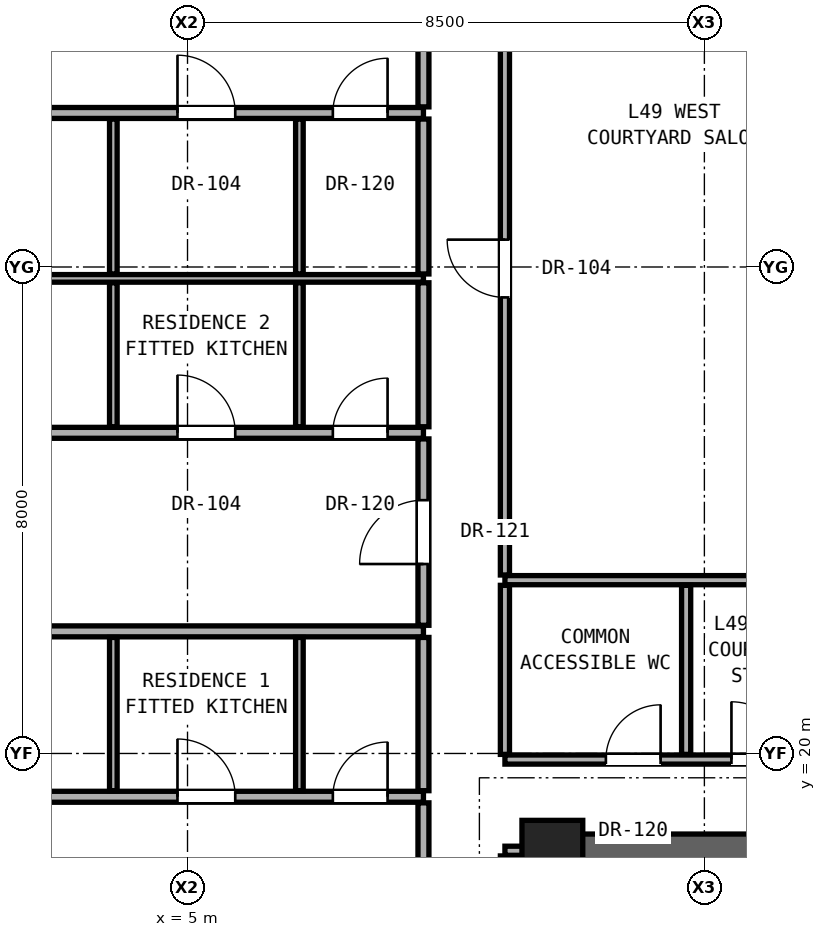
"""IFC4 building model, lengths in metres.
Left out: names, types, materials, properties, quantities, classifications, styles, units other than length and angle.
Written with IfcOpenShell. Run it as: python <this file> out.ifc"""

import sys

from ifc_helpers import new_model, si_unit, direction, frame, frame_2d, origin, origin_2d, place, context, subcontext, project, spatial, rectangle, extrude, element, fill, save


model = new_model("IFC4")
c1 = context("Model", 3, precision=1e-05, world=origin(), true_north=direction((0.0, 1.0)))
c2 = subcontext(c1, "Body", "Model", "MODEL_VIEW")
j1 = project(units=[si_unit("LENGTHUNIT", "METRE"), si_unit("PLANEANGLEUNIT", "RADIAN")], contexts=[c1])
p1 = place(None, origin())
s1 = spatial("IfcSite", under=j1, at=p1, CompositionType="ELEMENT")
p2 = place(p1, origin())
s2 = spatial("IfcBuilding", under=s1, at=p2, CompositionType="ELEMENT")
p3 = place(p2, frame((0.0, 0.0, 173.9)))
s3 = spatial("IfcBuildingStorey", under=s2, at=p3, CompositionType="ELEMENT", Elevation=173.9)
p4 = place(p3, frame((11.0, 18.4, 0.0), z_axis=(0.0, 0.0, 1.0), x_axis=(1.0, 0.0, 0.0)))
e1 = element("IfcColumn", 1, at=p4, inside=s3, PredefinedType="COLUMN", context=c2, shape_type="SweptSolid", body=[
    extrude(rectangle(XDim=1.0, YDim=1.0, at=origin_2d()), origin(), (0.0, 0.0, 1.0), 3.25),
])
p5 = place(p3, frame((11.0, 12.4, 0.0), z_axis=(0.0, 0.0, 1.0), x_axis=(0.0, 1.0, 0.0)))
e2 = element("IfcWall", 2, at=p5, inside=s3, PredefinedType="SHEAR", context=c2, shape_type="SweptSolid", body=[
    extrude(rectangle(XDim=6.0, YDim=0.55, at=frame_2d((3.0, 0.0))), origin(), (0.0, 0.0, 1.0), 3.05),
])
p6 = place(p3, frame((11.0, 18.4, 0.0), z_axis=(0.0, 0.0, 1.0), x_axis=(1.0, 0.0, 0.0)))
e3 = element("IfcWall", 3, at=p6, inside=s3, PredefinedType="SHEAR", context=c2, shape_type="SweptSolid", body=[
    extrude(rectangle(XDim=19.0, YDim=0.55, at=frame_2d((9.5, 0.0))), origin(), (0.0, 0.0, 1.0), 3.05),
])
p7 = place(p6, frame((4.175, 0.0, 0.0)))
e4 = element("IfcOpeningElement", 4, at=p7, cuts=e3, PredefinedType="OPENING", context=c2, shape_type="SweptSolid", body=[
    extrude(rectangle(XDim=1.2, YDim=2.25, at=frame_2d((0.6, 1.125))), frame((0.0, 0.285, 0.0), z_axis=(0.0, -1.0, 0.0), x_axis=(1.0, 0.0, 0.0)), (0.0, 0.0, 1.0), 0.57),
])
p8 = place(p6, frame((11.075, 0.0, 0.0)))
e5 = element("IfcOpeningElement", 5, at=p8, cuts=e3, PredefinedType="OPENING", context=c2, shape_type="SweptSolid", body=[
    extrude(rectangle(XDim=0.95, YDim=2.15, at=frame_2d((0.475, 1.075))), frame((0.0, 0.285, 0.0), z_axis=(0.0, -1.0, 0.0), x_axis=(1.0, 0.0, 0.0)), (0.0, 0.0, 1.0), 0.57),
])
p9 = place(p6, frame((14.3, 0.0, 0.0)))
e6 = element("IfcOpeningElement", 6, at=p9, cuts=e3, PredefinedType="OPENING", context=c2, shape_type="SweptSolid", body=[
    extrude(rectangle(XDim=1.3, YDim=2.3, at=frame_2d((0.65, 1.15))), frame((0.0, 0.285, 0.0), z_axis=(0.0, -1.0, 0.0), x_axis=(1.0, 0.0, 0.0)), (0.0, 0.0, 1.0), 0.57),
])
p10 = place(p6, frame((16.6, 0.0, 0.0)))
e7 = element("IfcOpeningElement", 7, at=p10, cuts=e3, PredefinedType="OPENING", context=c2, shape_type="SweptSolid", body=[
    extrude(rectangle(XDim=1.3, YDim=2.3, at=frame_2d((0.65, 1.15))), frame((0.0, 0.285, 0.0), z_axis=(0.0, -1.0, 0.0), x_axis=(1.0, 0.0, 0.0)), (0.0, 0.0, 1.0), 0.57),
])
p11 = place(p3, frame((10.22, 18.4, 0.0), z_axis=(0.0, 0.0, 1.0), x_axis=(1.0, 0.0, 0.0)))
e8 = element("IfcWall", 8, at=p11, inside=s3, PredefinedType="PARTITIONING", context=c2, shape_type="SweptSolid", body=[
    extrude(rectangle(XDim=0.51, YDim=0.15, at=frame_2d((0.255, 0.0))), origin(), (0.0, 0.0, 1.0), 2.442),
])
p12 = place(p3, frame((-0.81, 19.288, 0.0), z_axis=(0.0, 0.0, 1.0), x_axis=(1.0, 0.0, 0.0)))
e9 = element("IfcWall", 9, at=p12, inside=s3, PredefinedType="PARTITIONING", context=c2, shape_type="SweptSolid", body=[
    extrude(rectangle(XDim=9.69, YDim=0.18, at=frame_2d((4.845, 0.0))), origin(), (0.0, 0.0, 1.0), 2.269),
])
p13 = place(p12, frame((1.24, 0.0, 0.0)))
e10 = element("IfcOpeningElement", 10, at=p13, cuts=e9, PredefinedType="OPENING", context=c2, shape_type="SweptSolid", body=[
    extrude(rectangle(XDim=0.95, YDim=2.15, at=frame_2d((0.475, 1.075))), frame((0.0, 0.1, 0.0), z_axis=(0.0, -1.0, 0.0), x_axis=(1.0, 0.0, 0.0)), (0.0, 0.0, 1.0), 0.2),
])
p14 = place(p12, frame((5.645, 0.0, 0.0)))
e11 = element("IfcOpeningElement", 11, at=p14, cuts=e9, PredefinedType="OPENING", context=c2, shape_type="SweptSolid", body=[
    extrude(rectangle(XDim=0.95, YDim=2.15, at=frame_2d((0.475, 1.075))), frame((0.0, 0.1, 0.0), z_axis=(0.0, -1.0, 0.0), x_axis=(1.0, 0.0, 0.0)), (0.0, 0.0, 1.0), 0.2),
])
p15 = place(p12, frame((8.2, 0.0, 0.0)))
e12 = element("IfcOpeningElement", 12, at=p15, cuts=e9, PredefinedType="OPENING", context=c2, shape_type="SweptSolid", body=[
    extrude(rectangle(XDim=0.9, YDim=2.1, at=frame_2d((0.45, 1.05))), frame((0.0, 0.1, 0.0), z_axis=(0.0, -1.0, 0.0), x_axis=(1.0, 0.0, 0.0)), (0.0, 0.0, 1.0), 0.2),
])
p16 = place(p3, frame((10.22, 19.9, 0.0), z_axis=(0.0, 0.0, 1.0), x_axis=(1.0, 0.0, 0.0)))
e13 = element("IfcWall", 13, at=p16, inside=s3, PredefinedType="PARTITIONING", context=c2, shape_type="SweptSolid", body=[
    extrude(rectangle(XDim=20.56, YDim=0.15, at=frame_2d((10.28, 0.0))), origin(), (0.0, 0.0, 1.0), 2.186),
])
p17 = place(p16, frame((1.66, 0.0, 0.0)))
e14 = element("IfcOpeningElement", 14, at=p17, cuts=e13, PredefinedType="OPENING", context=c2, shape_type="SweptSolid", body=[
    extrude(rectangle(XDim=0.9, YDim=2.1, at=frame_2d((0.45, 1.05))), frame((0.0, 0.085, 0.0), z_axis=(0.0, -1.0, 0.0), x_axis=(1.0, 0.0, 0.0)), (0.0, 0.0, 1.0), 0.17),
])
p18 = place(p16, frame((3.725, 0.0, 0.0)))
e15 = element("IfcOpeningElement", 15, at=p18, cuts=e13, PredefinedType="OPENING", context=c2, shape_type="SweptSolid", body=[
    extrude(rectangle(XDim=0.95, YDim=2.15, at=frame_2d((0.475, 1.075))), frame((0.0, 0.085, 0.0), z_axis=(0.0, -1.0, 0.0), x_axis=(1.0, 0.0, 0.0)), (0.0, 0.0, 1.0), 0.17),
])
p19 = place(p16, frame((9.234, 0.0, 0.0)))
e16 = element("IfcOpeningElement", 16, at=p19, cuts=e13, PredefinedType="OPENING", context=c2, shape_type="SweptSolid", body=[
    extrude(rectangle(XDim=0.85, YDim=2.01, at=frame_2d((0.425, 1.005))), frame((0.0, 0.085, 0.0), z_axis=(0.0, -1.0, 0.0), x_axis=(1.0, 0.0, 0.0)), (0.0, 0.0, 1.0), 0.17),
])
p20 = place(p16, frame((16.784, 0.0, 0.0)))
e17 = element("IfcOpeningElement", 17, at=p20, cuts=e13, PredefinedType="OPENING", context=c2, shape_type="SweptSolid", body=[
    extrude(rectangle(XDim=0.85, YDim=2.01, at=frame_2d((0.425, 1.005))), frame((0.0, 0.085, 0.0), z_axis=(0.0, -1.0, 0.0), x_axis=(1.0, 0.0, 0.0)), (0.0, 0.0, 1.0), 0.17),
])
p21 = place(p3, frame((-0.81, 22.008, 0.0), z_axis=(0.0, 0.0, 1.0), x_axis=(1.0, 0.0, 0.0)))
e18 = element("IfcWall", 18, at=p21, inside=s3, PredefinedType="PARTITIONING", context=c2, shape_type="SweptSolid", body=[
    extrude(rectangle(XDim=9.69, YDim=0.18, at=frame_2d((4.845, 0.0))), origin(), (0.0, 0.0, 1.0), 2.269),
])
p22 = place(p3, frame((10.22, 22.85, 0.0), z_axis=(0.0, 0.0, 1.0), x_axis=(1.0, 0.0, 0.0)))
e19 = element("IfcWall", 19, at=p22, inside=s3, PredefinedType="PARTITIONING", context=c2, shape_type="SweptSolid", body=[
    extrude(rectangle(XDim=5.42, YDim=0.15, at=frame_2d((2.71, 0.0))), origin(), (0.0, 0.0, 1.0), 2.186),
])
p23 = place(p3, frame((-0.81, 25.273, 0.0), z_axis=(0.0, 0.0, 1.0), x_axis=(1.0, 0.0, 0.0)))
e20 = element("IfcWall", 20, at=p23, inside=s3, PredefinedType="PARTITIONING", context=c2, shape_type="SweptSolid", body=[
    extrude(rectangle(XDim=9.69, YDim=0.18, at=frame_2d((4.845, 0.0))), origin(), (0.0, 0.0, 1.0), 2.269),
])
p24 = place(p23, frame((1.24, 0.0, 0.0)))
e21 = element("IfcOpeningElement", 21, at=p24, cuts=e20, PredefinedType="OPENING", context=c2, shape_type="SweptSolid", body=[
    extrude(rectangle(XDim=0.95, YDim=2.15, at=frame_2d((0.475, 1.075))), frame((0.0, 0.1, 0.0), z_axis=(0.0, -1.0, 0.0), x_axis=(1.0, 0.0, 0.0)), (0.0, 0.0, 1.0), 0.2),
])
p25 = place(p23, frame((5.645, 0.0, 0.0)))
e22 = element("IfcOpeningElement", 22, at=p25, cuts=e20, PredefinedType="OPENING", context=c2, shape_type="SweptSolid", body=[
    extrude(rectangle(XDim=0.95, YDim=2.15, at=frame_2d((0.475, 1.075))), frame((0.0, 0.1, 0.0), z_axis=(0.0, -1.0, 0.0), x_axis=(1.0, 0.0, 0.0)), (0.0, 0.0, 1.0), 0.2),
])
p26 = place(p23, frame((8.2, 0.0, 0.0)))
e23 = element("IfcOpeningElement", 23, at=p26, cuts=e20, PredefinedType="OPENING", context=c2, shape_type="SweptSolid", body=[
    extrude(rectangle(XDim=0.9, YDim=2.1, at=frame_2d((0.45, 1.05))), frame((0.0, 0.1, 0.0), z_axis=(0.0, -1.0, 0.0), x_axis=(1.0, 0.0, 0.0)), (0.0, 0.0, 1.0), 0.2),
])
p27 = place(p3, frame((-0.81, 27.813, 0.0), z_axis=(0.0, 0.0, 1.0), x_axis=(1.0, 0.0, 0.0)))
e24 = element("IfcWall", 24, at=p27, inside=s3, PredefinedType="PARTITIONING", context=c2, shape_type="SweptSolid", body=[
    extrude(rectangle(XDim=9.69, YDim=0.125, at=frame_2d((4.845, 0.0))), origin(), (0.0, 0.0, 1.0), 2.269),
])
p28 = place(p3, frame((-0.81, 30.533, 0.0), z_axis=(0.0, 0.0, 1.0), x_axis=(1.0, 0.0, 0.0)))
e25 = element("IfcWall", 25, at=p28, inside=s3, PredefinedType="PARTITIONING", context=c2, shape_type="SweptSolid", body=[
    extrude(rectangle(XDim=9.69, YDim=0.18, at=frame_2d((4.845, 0.0))), origin(), (0.0, 0.0, 1.0), 2.269),
])
p29 = place(p28, frame((1.24, 0.0, 0.0)))
e26 = element("IfcOpeningElement", 26, at=p29, cuts=e25, PredefinedType="OPENING", context=c2, shape_type="SweptSolid", body=[
    extrude(rectangle(XDim=0.95, YDim=2.15, at=frame_2d((0.475, 1.075))), frame((0.0, 0.1, 0.0), z_axis=(0.0, -1.0, 0.0), x_axis=(1.0, 0.0, 0.0)), (0.0, 0.0, 1.0), 0.2),
])
p30 = place(p28, frame((5.645, 0.0, 0.0)))
e27 = element("IfcOpeningElement", 27, at=p30, cuts=e25, PredefinedType="OPENING", context=c2, shape_type="SweptSolid", body=[
    extrude(rectangle(XDim=0.95, YDim=2.15, at=frame_2d((0.475, 1.075))), frame((0.0, 0.1, 0.0), z_axis=(0.0, -1.0, 0.0), x_axis=(1.0, 0.0, 0.0)), (0.0, 0.0, 1.0), 0.2),
])
p31 = place(p28, frame((8.2, 0.0, 0.0)))
e28 = element("IfcOpeningElement", 28, at=p31, cuts=e25, PredefinedType="OPENING", context=c2, shape_type="SweptSolid", body=[
    extrude(rectangle(XDim=0.9, YDim=2.1, at=frame_2d((0.45, 1.05))), frame((0.0, 0.1, 0.0), z_axis=(0.0, -1.0, 0.0), x_axis=(1.0, 0.0, 0.0)), (0.0, 0.0, 1.0), 0.2),
])
p32 = place(p3, frame((3.78, 19.388, 0.0), z_axis=(0.0, 0.0, 1.0), x_axis=(0.0, 1.0, 0.0)))
e29 = element("IfcWall", 29, at=p32, inside=s3, PredefinedType="PARTITIONING", context=c2, shape_type="SweptSolid", body=[
    extrude(rectangle(XDim=2.52, YDim=0.125, at=frame_2d((1.26, 0.0))), origin(), (0.0, 0.0, 1.0), 3.05),
])
p33 = place(p3, frame((3.78, 25.373, 0.0), z_axis=(0.0, 0.0, 1.0), x_axis=(0.0, 1.0, 0.0)))
e30 = element("IfcWall", 30, at=p33, inside=s3, PredefinedType="PARTITIONING", context=c2, shape_type="SweptSolid", body=[
    extrude(rectangle(XDim=2.367, YDim=0.125, at=frame_2d((1.184, 0.0))), origin(), (0.0, 0.0, 1.0), 3.05),
])
p34 = place(p3, frame((3.78, 27.885, 0.0), z_axis=(0.0, 0.0, 1.0), x_axis=(0.0, 1.0, 0.0)))
e31 = element("IfcWall", 31, at=p34, inside=s3, PredefinedType="PARTITIONING", context=c2, shape_type="SweptSolid", body=[
    extrude(rectangle(XDim=2.548, YDim=0.125, at=frame_2d((1.274, 0.0))), origin(), (0.0, 0.0, 1.0), 3.05),
])
p35 = place(p3, frame((6.84, 19.388, 0.0), z_axis=(0.0, 0.0, 1.0), x_axis=(0.0, 1.0, 0.0)))
e32 = element("IfcWall", 32, at=p35, inside=s3, PredefinedType="PARTITIONING", context=c2, shape_type="SweptSolid", body=[
    extrude(rectangle(XDim=2.52, YDim=0.125, at=frame_2d((1.26, 0.0))), origin(), (0.0, 0.0, 1.0), 3.05),
])
p36 = place(p3, frame((6.84, 25.373, 0.0), z_axis=(0.0, 0.0, 1.0), x_axis=(0.0, 1.0, 0.0)))
e33 = element("IfcWall", 33, at=p36, inside=s3, PredefinedType="PARTITIONING", context=c2, shape_type="SweptSolid", body=[
    extrude(rectangle(XDim=2.367, YDim=0.125, at=frame_2d((1.184, 0.0))), origin(), (0.0, 0.0, 1.0), 3.05),
])
p37 = place(p3, frame((6.84, 27.885, 0.0), z_axis=(0.0, 0.0, 1.0), x_axis=(0.0, 1.0, 0.0)))
e34 = element("IfcWall", 34, at=p37, inside=s3, PredefinedType="PARTITIONING", context=c2, shape_type="SweptSolid", body=[
    extrude(rectangle(XDim=2.548, YDim=0.125, at=frame_2d((1.274, 0.0))), origin(), (0.0, 0.0, 1.0), 3.05),
])
p38 = place(p3, frame((8.88, 14.587, 0.0), z_axis=(0.0, 0.0, 1.0), x_axis=(0.0, 1.0, 0.0)))
e35 = element("IfcWall", 35, at=p38, inside=s3, PredefinedType="PARTITIONING", context=c2, shape_type="SweptSolid", body=[
    extrude(rectangle(XDim=4.601, YDim=0.18, at=frame_2d((2.301, 0.0))), origin(), (0.0, 0.0, 1.0), 2.442),
])
p39 = place(p38, frame((2.075, 0.0, 0.0)))
e36 = element("IfcOpeningElement", 36, at=p39, cuts=e35, PredefinedType="OPENING", context=c2, shape_type="SweptSolid", body=[
    extrude(rectangle(XDim=1.05, YDim=2.2, at=frame_2d((0.525, 1.1))), frame((0.0, 0.1, 0.0), z_axis=(0.0, -1.0, 0.0), x_axis=(1.0, 0.0, 0.0)), (0.0, 0.0, 1.0), 0.2),
])
p40 = place(p3, frame((8.88, 19.388, 0.0), z_axis=(0.0, 0.0, 1.0), x_axis=(0.0, 1.0, 0.0)))
e37 = element("IfcWall", 37, at=p40, inside=s3, PredefinedType="PARTITIONING", context=c2, shape_type="SweptSolid", body=[
    extrude(rectangle(XDim=2.52, YDim=0.18, at=frame_2d((1.26, 0.0))), origin(), (0.0, 0.0, 1.0), 3.05),
])
p41 = place(p3, frame((8.88, 22.108, 0.0), z_axis=(0.0, 0.0, 1.0), x_axis=(0.0, 1.0, 0.0)))
e38 = element("IfcWall", 38, at=p41, inside=s3, PredefinedType="PARTITIONING", context=c2, shape_type="SweptSolid", body=[
    extrude(rectangle(XDim=3.065, YDim=0.18, at=frame_2d((1.533, 0.0))), origin(), (0.0, 0.0, 1.0), 2.346),
])
p42 = place(p41, frame((1.008, 0.0, 0.0)))
e39 = element("IfcOpeningElement", 39, at=p42, cuts=e38, PredefinedType="OPENING", context=c2, shape_type="SweptSolid", body=[
    extrude(rectangle(XDim=1.05, YDim=2.2, at=frame_2d((0.525, 1.1))), frame((0.0, 0.1, 0.0), z_axis=(0.0, -1.0, 0.0), x_axis=(1.0, 0.0, 0.0)), (0.0, 0.0, 1.0), 0.2),
])
p43 = place(p3, frame((8.88, 25.373, 0.0), z_axis=(0.0, 0.0, 1.0), x_axis=(0.0, 1.0, 0.0)))
e40 = element("IfcWall", 40, at=p43, inside=s3, PredefinedType="PARTITIONING", context=c2, shape_type="SweptSolid", body=[
    extrude(rectangle(XDim=2.367, YDim=0.18, at=frame_2d((1.184, 0.0))), origin(), (0.0, 0.0, 1.0), 3.05),
])
p44 = place(p3, frame((8.88, 27.885, 0.0), z_axis=(0.0, 0.0, 1.0), x_axis=(0.0, 1.0, 0.0)))
e41 = element("IfcWall", 41, at=p44, inside=s3, PredefinedType="PARTITIONING", context=c2, shape_type="SweptSolid", body=[
    extrude(rectangle(XDim=2.548, YDim=0.18, at=frame_2d((1.274, 0.0))), origin(), (0.0, 0.0, 1.0), 3.05),
])
p45 = place(p3, frame((8.88, 30.633, 0.0), z_axis=(0.0, 0.0, 1.0), x_axis=(0.0, 1.0, 0.0)))
e42 = element("IfcWall", 42, at=p45, inside=s3, PredefinedType="PARTITIONING", context=c2, shape_type="SweptSolid", body=[
    extrude(rectangle(XDim=3.447, YDim=0.18, at=frame_2d((1.724, 0.0))), origin(), (0.0, 0.0, 1.0), 2.346),
])
p46 = place(p45, frame((1.198, 0.0, 0.0)))
e43 = element("IfcOpeningElement", 43, at=p46, cuts=e42, PredefinedType="OPENING", context=c2, shape_type="SweptSolid", body=[
    extrude(rectangle(XDim=1.05, YDim=2.2, at=frame_2d((0.525, 1.1))), frame((0.0, 0.1, 0.0), z_axis=(0.0, -1.0, 0.0), x_axis=(1.0, 0.0, 0.0)), (0.0, 0.0, 1.0), 0.2),
])
p47 = place(p3, frame((10.22, 12.335, 0.0), z_axis=(0.0, 0.0, 1.0), x_axis=(0.0, 1.0, 0.0)))
e44 = element("IfcWall", 44, at=p47, inside=s3, PredefinedType="PARTITIONING", context=c2, shape_type="SweptSolid", body=[
    extrude(rectangle(XDim=5.98, YDim=0.15, at=frame_2d((2.99, 0.0))), origin(), (0.0, 0.0, 1.0), 2.442),
])
p48 = place(p3, frame((10.22, 19.985, 0.0), z_axis=(0.0, 0.0, 1.0), x_axis=(0.0, 1.0, 0.0)))
e45 = element("IfcWall", 45, at=p48, inside=s3, PredefinedType="PARTITIONING", context=c2, shape_type="SweptSolid", body=[
    extrude(rectangle(XDim=2.78, YDim=0.15, at=frame_2d((1.39, 0.0))), origin(), (0.0, 0.0, 1.0), 3.05),
])
p49 = place(p3, frame((10.22, 22.935, 0.0), z_axis=(0.0, 0.0, 1.0), x_axis=(0.0, 1.0, 0.0)))
e46 = element("IfcWall", 46, at=p49, inside=s3, PredefinedType="PARTITIONING", context=c2, shape_type="SweptSolid", body=[
    extrude(rectangle(XDim=10.08, YDim=0.15, at=frame_2d((5.04, 0.0))), origin(), (0.0, 0.0, 1.0), 2.346),
])
p50 = place(p49, frame((4.565, 0.0, 0.0)))
e47 = element("IfcOpeningElement", 47, at=p50, cuts=e46, PredefinedType="OPENING", context=c2, shape_type="SweptSolid", body=[
    extrude(rectangle(XDim=0.95, YDim=2.15, at=frame_2d((0.475, 1.075))), frame((0.0, 0.085, 0.0), z_axis=(0.0, -1.0, 0.0), x_axis=(1.0, 0.0, 0.0)), (0.0, 0.0, 1.0), 0.17),
])
p51 = place(p3, frame((13.2, 19.985, 0.0), z_axis=(0.0, 0.0, 1.0), x_axis=(0.0, 1.0, 0.0)))
e48 = element("IfcWall", 48, at=p51, inside=s3, PredefinedType="PARTITIONING", context=c2, shape_type="SweptSolid", body=[
    extrude(rectangle(XDim=2.78, YDim=0.15, at=frame_2d((1.39, 0.0))), origin(), (0.0, 0.0, 1.0), 3.05),
])
p52 = place(p17, origin())
e49 = element("IfcDoor", 49, at=p52, inside=s3, OperationType="SINGLE_SWING_RIGHT", PredefinedType="DOOR", context=c2, shape_type="SweptSolid", body=[
    extrude(rectangle(XDim=0.9, YDim=2.1, at=frame_2d((0.45, 1.05))), frame((0.0, 0.025, 0.0), z_axis=(0.0, -1.0, 0.0), x_axis=(1.0, 0.0, 0.0)), (0.0, 0.0, 1.0), 0.05),
])
fill(e14, e49)
p53 = place(p14, origin())
e50 = element("IfcDoor", 50, at=p53, inside=s3, OperationType="SINGLE_SWING_LEFT", PredefinedType="DOOR", context=c2, shape_type="SweptSolid", body=[
    extrude(rectangle(XDim=0.95, YDim=2.15, at=frame_2d((0.475, 1.075))), frame((0.0, 0.025, 0.0), z_axis=(0.0, -1.0, 0.0), x_axis=(1.0, 0.0, 0.0)), (0.0, 0.0, 1.0), 0.05),
])
fill(e11, e50)
p54 = place(p15, origin())
e51 = element("IfcDoor", 51, at=p54, inside=s3, OperationType="SINGLE_SWING_RIGHT", PredefinedType="DOOR", context=c2, shape_type="SweptSolid", body=[
    extrude(rectangle(XDim=0.9, YDim=2.1, at=frame_2d((0.45, 1.05))), frame((0.0, 0.025, 0.0), z_axis=(0.0, -1.0, 0.0), x_axis=(1.0, 0.0, 0.0)), (0.0, 0.0, 1.0), 0.05),
])
fill(e12, e51)
p55 = place(p42, origin())
e52 = element("IfcDoor", 52, at=p55, inside=s3, OperationType="SINGLE_SWING_LEFT", PredefinedType="DOOR", context=c2, shape_type="SweptSolid", body=[
    extrude(rectangle(XDim=1.05, YDim=2.2, at=frame_2d((0.525, 1.1))), frame((0.0, 0.025, 0.0), z_axis=(0.0, -1.0, 0.0), x_axis=(1.0, 0.0, 0.0)), (0.0, 0.0, 1.0), 0.05),
])
fill(e39, e52)
p56 = place(p25, origin())
e53 = element("IfcDoor", 53, at=p56, inside=s3, OperationType="SINGLE_SWING_LEFT", PredefinedType="DOOR", context=c2, shape_type="SweptSolid", body=[
    extrude(rectangle(XDim=0.95, YDim=2.15, at=frame_2d((0.475, 1.075))), frame((0.0, 0.025, 0.0), z_axis=(0.0, -1.0, 0.0), x_axis=(1.0, 0.0, 0.0)), (0.0, 0.0, 1.0), 0.05),
])
fill(e22, e53)
p57 = place(p26, origin())
e54 = element("IfcDoor", 54, at=p57, inside=s3, OperationType="SINGLE_SWING_RIGHT", PredefinedType="DOOR", context=c2, shape_type="SweptSolid", body=[
    extrude(rectangle(XDim=0.9, YDim=2.1, at=frame_2d((0.45, 1.05))), frame((0.0, 0.025, 0.0), z_axis=(0.0, -1.0, 0.0), x_axis=(1.0, 0.0, 0.0)), (0.0, 0.0, 1.0), 0.05),
])
fill(e23, e54)
p58 = place(p30, origin())
e55 = element("IfcDoor", 55, at=p58, inside=s3, OperationType="SINGLE_SWING_LEFT", PredefinedType="DOOR", context=c2, shape_type="SweptSolid", body=[
    extrude(rectangle(XDim=0.95, YDim=2.15, at=frame_2d((0.475, 1.075))), frame((0.0, 0.025, 0.0), z_axis=(0.0, -1.0, 0.0), x_axis=(1.0, 0.0, 0.0)), (0.0, 0.0, 1.0), 0.05),
])
fill(e27, e55)
p59 = place(p31, origin())
e56 = element("IfcDoor", 56, at=p59, inside=s3, OperationType="SINGLE_SWING_RIGHT", PredefinedType="DOOR", context=c2, shape_type="SweptSolid", body=[
    extrude(rectangle(XDim=0.9, YDim=2.1, at=frame_2d((0.45, 1.05))), frame((0.0, 0.025, 0.0), z_axis=(0.0, -1.0, 0.0), x_axis=(1.0, 0.0, 0.0)), (0.0, 0.0, 1.0), 0.05),
])
fill(e28, e56)
p60 = place(p18, origin())
e57 = element("IfcDoor", 57, at=p60, inside=s3, OperationType="SINGLE_SWING_LEFT", PredefinedType="DOOR", context=c2, shape_type="SweptSolid", body=[
    extrude(rectangle(XDim=0.95, YDim=2.15, at=frame_2d((0.475, 1.075))), frame((0.0, 0.025, 0.0), z_axis=(0.0, -1.0, 0.0), x_axis=(1.0, 0.0, 0.0)), (0.0, 0.0, 1.0), 0.05),
])
fill(e15, e57)
p61 = place(p50, origin())
e58 = element("IfcDoor", 58, at=p61, inside=s3, OperationType="SINGLE_SWING_RIGHT", PredefinedType="DOOR", context=c2, shape_type="SweptSolid", body=[
    extrude(rectangle(XDim=0.95, YDim=2.15, at=frame_2d((0.475, 1.075))), frame((0.0, 0.025, 0.0), z_axis=(0.0, -1.0, 0.0), x_axis=(1.0, 0.0, 0.0)), (0.0, 0.0, 1.0), 0.05),
])
fill(e47, e58)
save(model, sys.argv[1])
